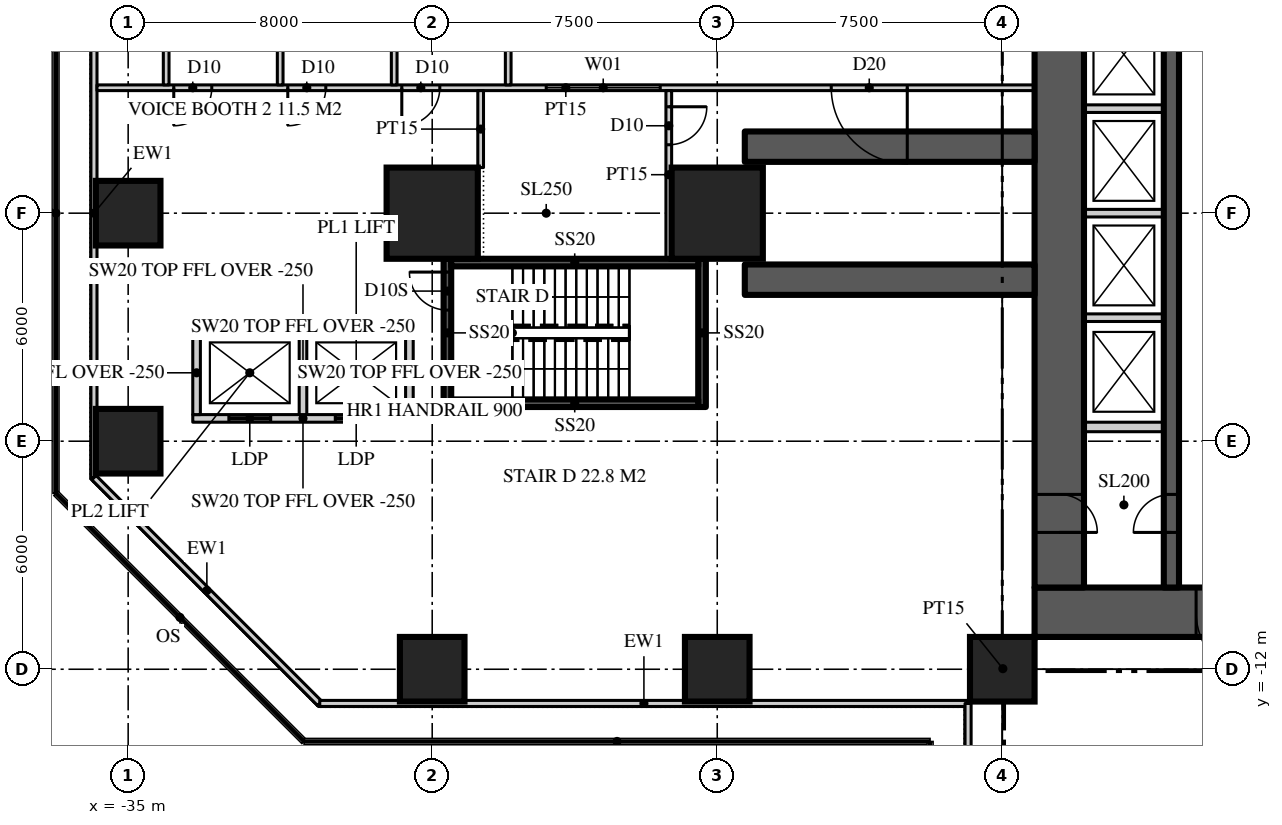
"""IFC4 building model, lengths in metres.
Left out: names, types, materials, properties, quantities, classifications, styles, units other than length and angle.
Written with IfcOpenShell. Run it as: python <this file> out.ifc"""

import sys

from ifc_helpers import new_model, si_unit, direction, frame, frame_2d, origin, origin_2d, place, context, subcontext, project, spatial, rectangle, extrude, element, fill, save


model = new_model("IFC4")
c1 = context("Model", 3, precision=1e-05, world=origin(), true_north=direction((0.0, 1.0)))
c2 = subcontext(c1, "Body", "Model", "MODEL_VIEW")
j1 = project(units=[si_unit("LENGTHUNIT", "METRE"), si_unit("PLANEANGLEUNIT", "RADIAN")], contexts=[c1])
p1 = place(None, origin())
s1 = spatial("IfcSite", under=j1, at=p1, CompositionType="ELEMENT")
p2 = place(p1, origin())
s2 = spatial("IfcBuilding", under=s1, at=p2, CompositionType="ELEMENT")
p3 = place(p2, frame((0.0, 0.0, 15.0)))
s3 = spatial("IfcBuildingStorey", under=s2, at=p3, CompositionType="ELEMENT", Elevation=15.0)
p4 = place(p3, frame((11.15, -10.5, 0.0), z_axis=(0.0, 0.0, 1.0), x_axis=(-1.0, 0.0, 0.0)))
e1 = element("IfcWall", 1, at=p4, inside=s3, PredefinedType="SHEAR", context=c2, shape_type="SweptSolid", body=[
    extrude(rectangle(XDim=22.3, YDim=1.3, at=frame_2d((11.15, 0.0))), origin(), (0.0, 0.0, 1.0), 8.0),
])
p5 = place(p4, frame((16.25, 0.0, 0.0)))
e2 = element("IfcOpeningElement", 2, at=p5, cuts=e1, PredefinedType="OPENING", context=c2, shape_type="SweptSolid", body=[
    extrude(rectangle(XDim=1.8, YDim=2.2, at=frame_2d((0.9, 1.1))), frame((0.0, 0.66, 0.0), z_axis=(0.0, -1.0, 0.0), x_axis=(1.0, 0.0, 0.0)), (0.0, 0.0, 1.0), 1.32),
])
p6 = place(p4, frame((4.25, 0.0, 0.0)))
e3 = element("IfcOpeningElement", 3, at=p6, cuts=e1, PredefinedType="OPENING", context=c2, shape_type="SweptSolid", body=[
    extrude(rectangle(XDim=1.8, YDim=2.2, at=frame_2d((0.9, 1.1))), frame((0.0, 0.66, 0.0), z_axis=(0.0, -1.0, 0.0), x_axis=(1.0, 0.0, 0.0)), (0.0, 0.0, 1.0), 1.32),
])
p7 = place(p3, frame((-10.5, 9.85, 0.0), z_axis=(0.0, 0.0, 1.0), x_axis=(0.0, -1.0, 0.0)))
e4 = element("IfcWall", 4, at=p7, inside=s3, PredefinedType="SHEAR", context=c2, shape_type="SweptSolid", body=[
    extrude(rectangle(XDim=19.7, YDim=1.3, at=frame_2d((9.85, 0.0))), origin(), (0.0, 0.0, 1.0), 8.0),
])
p8 = place(p7, frame((17.25, 0.0, 0.0)))
e5 = element("IfcOpeningElement", 5, at=p8, cuts=e4, PredefinedType="OPENING", context=c2, shape_type="SweptSolid", body=[
    extrude(rectangle(XDim=1.0, YDim=2.2, at=frame_2d((0.5, 1.1))), frame((0.0, 0.66, 0.0), z_axis=(0.0, -1.0, 0.0), x_axis=(1.0, 0.0, 0.0)), (0.0, 0.0, 1.0), 1.32),
])
for number, where, z_axis, x_axis in (
    (6, (-11.15, 1.75, 0.0), (0.0, 0.0, 1.0), (-1.0, 0.0, 0.0)),
    (7, (-11.15, -1.75, 0.0), (0.0, 0.0, 1.0), (-1.0, 0.0, 0.0)),
):
    element("IfcWall", number, at=place(p3, frame(where, z_axis=z_axis, x_axis=x_axis)), inside=s3, PredefinedType="SHEAR", context=c2, shape_type="SweptSolid", body=[
        extrude(rectangle(XDim=7.625, YDim=0.8, at=frame_2d((3.812, 0.0))), origin(), (0.0, 0.0, 1.0), 8.0),
    ])
for number, where, z_axis, x_axis in (
    (8, (-27.0, -12.0, 0.0), (0.0, 0.0, 1.0), (1.0, 0.0, 0.0)),
    (9, (-19.5, -12.0, 0.0), (0.0, 0.0, 1.0), (1.0, 0.0, 0.0)),
    (10, (-12.0, -12.0, 0.0), (0.0, 0.0, 1.0), (1.0, 0.0, 0.0)),
    (11, (-35.0, -6.0, 0.0), (0.0, 0.0, 1.0), (1.0, 0.0, 0.0)),
    (12, (-35.0, 0.0, 0.0), (0.0, 0.0, 1.0), (1.0, 0.0, 0.0)),
):
    element("IfcColumn", number, at=place(p3, frame(where, z_axis=z_axis, x_axis=x_axis)), inside=s3, PredefinedType="COLUMN", context=c2, shape_type="SweptSolid", body=[
        extrude(rectangle(XDim=1.7, YDim=1.7, at=origin_2d()), origin(), (0.0, 0.0, 1.0), 8.0),
    ])
for number, where, z_axis, x_axis in (
    (13, (-27.0, 0.0, 0.0), (0.0, 0.0, 1.0), (1.0, 0.0, 0.0)),
    (14, (-19.5, 0.0, 0.0), (0.0, 0.0, 1.0), (1.0, 0.0, 0.0)),
):
    element("IfcColumn", number, at=place(p3, frame(where, z_axis=z_axis, x_axis=x_axis)), inside=s3, PredefinedType="COLUMN", context=c2, shape_type="SweptSolid", body=[
        extrude(rectangle(XDim=2.4, YDim=2.4, at=origin_2d()), origin(), (0.0, 0.0, 1.0), 8.0),
    ])
p9 = place(p3, frame((-35.9, 6.958, 0.0), z_axis=(0.0, 0.0, 1.0), x_axis=(0.0, -1.0, 0.0)))
e15 = element("IfcWall", 15, at=p9, inside=s3, PredefinedType="SOLIDWALL", context=c2, shape_type="SweptSolid", body=[
    extrude(rectangle(XDim=13.917, YDim=0.16, at=frame_2d((6.958, 0.0))), origin(), (0.0, 0.0, 1.0), 7.75),
])
p10 = place(p3, frame((-35.9, -6.958, 0.0), z_axis=(0.0, 0.0, 1.0), x_axis=(0.707106781187, -0.707106781187, 0.0)))
e16 = element("IfcWall", 16, at=p10, inside=s3, PredefinedType="SOLIDWALL", context=c2, shape_type="SweptSolid", body=[
    extrude(rectangle(XDim=8.402, YDim=0.16, at=frame_2d((4.201, 0.0))), origin(), (0.0, 0.0, 1.0), 7.75),
])
for number, where, z_axis, x_axis in (
    (17, (-29.958, -12.9, 0.0), (0.0, 0.0, 1.0), (1.0, 0.0, 0.0)),
    (18, (-12.9, -12.9, 0.0), (0.0, 0.0, 1.0), (0.0, -1.0, 0.0)),
):
    element("IfcWall", number, at=place(p3, frame(where, z_axis=z_axis, x_axis=x_axis)), inside=s3, PredefinedType="SOLIDWALL", context=c2, shape_type="SweptSolid", body=[
        extrude(rectangle(XDim=17.059, YDim=0.16, at=frame_2d((8.529, 0.0))), origin(), (0.0, 0.0, 1.0), 7.75),
    ])
p11 = place(p3, frame((-7.55, -9.85, 0.0), z_axis=(0.0, 0.0, 1.0), x_axis=(0.0, 1.0, 0.0)))
e19 = element("IfcWall", 19, at=p11, inside=s3, PredefinedType="SHEAR", context=c2, shape_type="SweptSolid", body=[
    extrude(rectangle(XDim=19.7, YDim=0.4, at=frame_2d((9.85, 0.0))), origin(), (0.0, 0.0, 1.0), 8.0),
])
p12 = place(p11, frame((1.45, 0.0, 0.0)))
e20 = element("IfcOpeningElement", 20, at=p12, cuts=e19, PredefinedType="OPENING", context=c2, shape_type="SweptSolid", body=[
    extrude(rectangle(XDim=1.0, YDim=2.2, at=frame_2d((0.5, 1.1))), frame((0.0, 0.21, 0.0), z_axis=(0.0, -1.0, 0.0), x_axis=(1.0, 0.0, 0.0)), (0.0, 0.0, 1.0), 0.42),
])
p13 = place(p11, frame((17.3, 0.0, 0.0)))
e21 = element("IfcOpeningElement", 21, at=p13, cuts=e19, PredefinedType="OPENING", context=c2, shape_type="SweptSolid", body=[
    extrude(rectangle(XDim=0.9, YDim=2.1, at=frame_2d((0.45, 1.05))), frame((0.0, 0.21, 0.0), z_axis=(0.0, -1.0, 0.0), x_axis=(1.0, 0.0, 0.0)), (0.0, 0.0, 1.0), 0.42),
])
p14 = place(p3, frame((-9.85, -5.625, 0.0), z_axis=(0.0, 0.0, 1.0), x_axis=(1.0, 0.0, 0.0)))
e22 = element("IfcWall", 22, at=p14, inside=s3, PredefinedType="SOLIDWALL", context=c2, shape_type="SweptSolid", body=[
    extrude(rectangle(XDim=2.1, YDim=0.25, at=frame_2d((1.05, 0.0))), origin(), (0.0, 0.0, 1.0), 7.8),
])
for number, where, z_axis, x_axis in (
    (23, (-9.85, -2.75, 0.0), (0.0, 0.0, 1.0), (1.0, 0.0, 0.0)),
    (24, (-9.85, 0.0, 0.0), (0.0, 0.0, 1.0), (1.0, 0.0, 0.0)),
    (25, (-9.85, 2.75, 0.0), (0.0, 0.0, 1.0), (1.0, 0.0, 0.0)),
):
    element("IfcWall", number, at=place(p3, frame(where, z_axis=z_axis, x_axis=x_axis)), inside=s3, PredefinedType="SOLIDWALL", context=c2, shape_type="SweptSolid", body=[
        extrude(rectangle(XDim=2.1, YDim=0.2, at=frame_2d((1.05, 0.0))), origin(), (0.0, 0.0, 1.0), 7.8),
    ])
p15 = place(p3, frame((-11.15, 3.3, 0.0), z_axis=(0.0, 0.0, 1.0), x_axis=(-1.0, 0.0, 0.0)))
e26 = element("IfcWall", 26, at=p15, inside=s3, PredefinedType="PARTITIONING", context=c2, shape_type="SweptSolid", body=[
    extrude(rectangle(XDim=24.67, YDim=0.15, at=frame_2d((12.335, 0.0))), origin(), (0.0, 0.0, 1.0), 7.75),
])
p16 = place(p15, frame((3.35, 0.0, 0.0)))
e27 = element("IfcOpeningElement", 27, at=p16, cuts=e26, PredefinedType="OPENING", context=c2, shape_type="SweptSolid", body=[
    extrude(rectangle(XDim=2.0, YDim=2.6, at=frame_2d((1.0, 1.3))), frame((0.0, 0.085, 0.0), z_axis=(0.0, -1.0, 0.0), x_axis=(1.0, 0.0, 0.0)), (0.0, 0.0, 1.0), 0.17),
])
p17 = place(p15, frame((15.65, 0.0, 0.0)))
e28 = element("IfcOpeningElement", 28, at=p17, cuts=e26, PredefinedType="OPENING", context=c2, shape_type="SweptSolid", body=[
    extrude(rectangle(XDim=1.0, YDim=2.2, at=frame_2d((0.5, 1.1))), frame((0.0, 0.085, 0.0), z_axis=(0.0, -1.0, 0.0), x_axis=(1.0, 0.0, 0.0)), (0.0, 0.0, 1.0), 0.17),
])
p18 = place(p15, frame((18.65, 0.0, 0.0)))
e29 = element("IfcOpeningElement", 29, at=p18, cuts=e26, PredefinedType="OPENING", context=c2, shape_type="SweptSolid", body=[
    extrude(rectangle(XDim=1.0, YDim=2.2, at=frame_2d((0.5, 1.1))), frame((0.0, 0.085, 0.0), z_axis=(0.0, -1.0, 0.0), x_axis=(1.0, 0.0, 0.0)), (0.0, 0.0, 1.0), 0.17),
])
p19 = place(p15, frame((21.65, 0.0, 0.0)))
e30 = element("IfcOpeningElement", 30, at=p19, cuts=e26, PredefinedType="OPENING", context=c2, shape_type="SweptSolid", body=[
    extrude(rectangle(XDim=1.0, YDim=2.2, at=frame_2d((0.5, 1.1))), frame((0.0, 0.085, 0.0), z_axis=(0.0, -1.0, 0.0), x_axis=(1.0, 0.0, 0.0)), (0.0, 0.0, 1.0), 0.17),
])
p20 = place(p15, frame((9.85, 0.0, 0.9)))
e31 = element("IfcOpeningElement", 31, at=p20, cuts=e26, PredefinedType="OPENING", context=c2, shape_type="SweptSolid", body=[
    extrude(rectangle(XDim=3.0, YDim=1.5, at=frame_2d((1.5, 0.75))), frame((0.0, 0.085, 0.0), z_axis=(0.0, -1.0, 0.0), x_axis=(1.0, 0.0, 0.0)), (0.0, 0.0, 1.0), 0.17),
])
p21 = place(p3, frame((-20.775, 3.225, 0.0), z_axis=(0.0, 0.0, 1.0), x_axis=(0.0, -1.0, 0.0)))
e32 = element("IfcWall", 32, at=p21, inside=s3, PredefinedType="PARTITIONING", context=c2, shape_type="SweptSolid", body=[
    extrude(rectangle(XDim=4.425, YDim=0.15, at=frame_2d((2.212, 0.0))), origin(), (0.0, 0.0, 1.0), 7.75),
])
p22 = place(p21, frame((0.425, 0.0, 0.0)))
e33 = element("IfcOpeningElement", 33, at=p22, cuts=e32, PredefinedType="OPENING", context=c2, shape_type="SweptSolid", body=[
    extrude(rectangle(XDim=1.0, YDim=2.2, at=frame_2d((0.5, 1.1))), frame((0.0, 0.085, 0.0), z_axis=(0.0, -1.0, 0.0), x_axis=(1.0, 0.0, 0.0)), (0.0, 0.0, 1.0), 0.17),
])
p23 = place(p3, frame((-25.725, 3.225, 0.0), z_axis=(0.0, 0.0, 1.0), x_axis=(0.0, -1.0, 0.0)))
e34 = element("IfcWall", 34, at=p23, inside=s3, PredefinedType="PARTITIONING", context=c2, shape_type="SweptSolid", body=[
    extrude(rectangle(XDim=2.025, YDim=0.15, at=frame_2d((1.013, 0.0))), origin(), (0.0, 0.0, 1.0), 7.75),
])
for number, where, z_axis, x_axis in (
    (35, (-25.0, 3.375, 0.0), (0.0, 0.0, 1.0), (0.0, 1.0, 0.0)),
    (36, (-28.0, 3.375, 0.0), (0.0, 0.0, 1.0), (0.0, 1.0, 0.0)),
    (37, (-31.0, 3.375, 0.0), (0.0, 0.0, 1.0), (0.0, 1.0, 0.0)),
    (38, (-34.0, 3.375, 0.0), (0.0, 0.0, 1.0), (0.0, 1.0, 0.0)),
):
    element("IfcWall", number, at=place(p3, frame(where, z_axis=z_axis, x_axis=x_axis)), inside=s3, PredefinedType="PARTITIONING", context=c2, shape_type="SweptSolid", body=[
        extrude(rectangle(XDim=4.025, YDim=0.15, at=frame_2d((2.012, 0.0))), origin(), (0.0, 0.0, 1.0), 7.75),
    ])
p24 = place(p3, frame((-11.15, -11.15, 0.0), z_axis=(0.0, 0.0, 1.0), x_axis=(-0.707106781187, -0.707106781187, 0.0)))
e39 = element("IfcWall", 39, at=p24, inside=s3, PredefinedType="PARTITIONING", context=c2, shape_type="SweptSolid", body=[
    extrude(rectangle(XDim=2.362, YDim=0.15, at=frame_2d((1.181, 0.0))), origin(), (0.0, 0.0, 1.0), 7.75),
])
p25 = place(p3, frame((-27.5, -3.0, 0.0), z_axis=(0.0, 0.0, 1.0), x_axis=(-1.0, 0.0, 0.0)))
e40 = element("IfcWall", 40, at=p25, inside=s3, PredefinedType="SOLIDWALL", context=c2, shape_type="SweptSolid", body=[
    extrude(rectangle(XDim=5.8, YDim=0.2, at=frame_2d((2.9, 0.0))), origin(), (0.0, 0.0, 1.0), 7.75),
])
p26 = place(p3, frame((-33.3, -5.4, 0.0), z_axis=(0.0, 0.0, 1.0), x_axis=(1.0, 0.0, 0.0)))
e41 = element("IfcWall", 41, at=p26, inside=s3, PredefinedType="SOLIDWALL", context=c2, shape_type="SweptSolid", body=[
    extrude(rectangle(XDim=5.8, YDim=0.2, at=frame_2d((2.9, 0.0))), origin(), (0.0, 0.0, 1.0), 7.75),
])
p27 = place(p26, frame((3.75, 0.0, 0.0)))
e42 = element("IfcOpeningElement", 42, at=p27, cuts=e41, PredefinedType="OPENING", context=c2, shape_type="SweptSolid", body=[
    extrude(rectangle(XDim=1.1, YDim=2.2, at=frame_2d((0.55, 1.1))), frame((0.0, 0.11, 0.0), z_axis=(0.0, -1.0, 0.0), x_axis=(1.0, 0.0, 0.0)), (0.0, 0.0, 1.0), 0.22),
])
p28 = place(p26, frame((0.95, 0.0, 0.0)))
e43 = element("IfcOpeningElement", 43, at=p28, cuts=e41, PredefinedType="OPENING", context=c2, shape_type="SweptSolid", body=[
    extrude(rectangle(XDim=1.1, YDim=2.2, at=frame_2d((0.55, 1.1))), frame((0.0, 0.11, 0.0), z_axis=(0.0, -1.0, 0.0), x_axis=(1.0, 0.0, 0.0)), (0.0, 0.0, 1.0), 0.22),
])
for number, where, z_axis, x_axis in (
    (44, (-27.6, -3.1, 0.0), (0.0, 0.0, 1.0), (0.0, -1.0, 0.0)),
    (45, (-30.4, -3.1, 0.0), (0.0, 0.0, 1.0), (0.0, -1.0, 0.0)),
    (46, (-33.2, -3.1, 0.0), (0.0, 0.0, 1.0), (0.0, -1.0, 0.0)),
):
    element("IfcWall", number, at=place(p3, frame(where, z_axis=z_axis, x_axis=x_axis)), inside=s3, PredefinedType="SOLIDWALL", context=c2, shape_type="SweptSolid", body=[
        extrude(rectangle(XDim=2.2, YDim=0.2, at=frame_2d((1.1, 0.0))), origin(), (0.0, 0.0, 1.0), 7.75),
    ])
p29 = place(p3, frame((-19.9, -1.2, 0.0), z_axis=(0.0, 0.0, 1.0), x_axis=(0.0, -1.0, 0.0)))
e47 = element("IfcWall", 47, at=p29, inside=s3, PredefinedType="SOLIDWALL", context=c2, shape_type="SweptSolid", body=[
    extrude(rectangle(XDim=3.9, YDim=0.2, at=frame_2d((1.95, 0.0))), origin(), (0.0, 0.0, 1.0), 7.75),
])
p30 = place(p3, frame((-26.6, -5.1, 0.0), z_axis=(0.0, 0.0, 1.0), x_axis=(0.0, 1.0, 0.0)))
e48 = element("IfcWall", 48, at=p30, inside=s3, PredefinedType="SOLIDWALL", context=c2, shape_type="SweptSolid", body=[
    extrude(rectangle(XDim=3.9, YDim=0.2, at=frame_2d((1.95, 0.0))), origin(), (0.0, 0.0, 1.0), 7.75),
])
p31 = place(p30, frame((2.55, 0.0, 0.0)))
e49 = element("IfcOpeningElement", 49, at=p31, cuts=e48, PredefinedType="OPENING", context=c2, shape_type="SweptSolid", body=[
    extrude(rectangle(XDim=1.0, YDim=2.2, at=frame_2d((0.5, 1.1))), frame((0.0, 0.11, 0.0), z_axis=(0.0, -1.0, 0.0), x_axis=(1.0, 0.0, 0.0)), (0.0, 0.0, 1.0), 0.22),
])
for number, where, z_axis, x_axis in (
    (50, (-20.0, -1.3, 0.0), (0.0, 0.0, 1.0), (-1.0, 0.0, 0.0)),
    (51, (-26.5, -5.0, 0.0), (0.0, 0.0, 1.0), (1.0, 0.0, 0.0)),
):
    element("IfcWall", number, at=place(p3, frame(where, z_axis=z_axis, x_axis=x_axis)), inside=s3, PredefinedType="SOLIDWALL", context=c2, shape_type="SweptSolid", body=[
        extrude(rectangle(XDim=6.5, YDim=0.2, at=frame_2d((3.25, 0.0))), origin(), (0.0, 0.0, 1.0), 7.75),
    ])
p32 = place(p27, origin())
e52 = element("IfcDoor", 52, at=p32, inside=s3, OperationType="SLIDING_TO_LEFT", PredefinedType="DOOR", context=c2, shape_type="SweptSolid", body=[
    extrude(rectangle(XDim=1.1, YDim=2.2, at=frame_2d((0.55, 1.1))), frame((0.0, 0.025, 0.0), z_axis=(0.0, -1.0, 0.0), x_axis=(1.0, 0.0, 0.0)), (0.0, 0.0, 1.0), 0.05),
])
fill(e42, e52)
p33 = place(p28, origin())
e53 = element("IfcDoor", 53, at=p33, inside=s3, OperationType="SLIDING_TO_LEFT", PredefinedType="DOOR", context=c2, shape_type="SweptSolid", body=[
    extrude(rectangle(XDim=1.1, YDim=2.2, at=frame_2d((0.55, 1.1))), frame((0.0, 0.025, 0.0), z_axis=(0.0, -1.0, 0.0), x_axis=(1.0, 0.0, 0.0)), (0.0, 0.0, 1.0), 0.05),
])
fill(e43, e53)
p34 = place(p5, origin())
e54 = element("IfcDoor", 54, at=p34, inside=s3, OperationType="DOUBLE_DOOR_DOUBLE_SWING", PredefinedType="DOOR", context=c2, shape_type="SweptSolid", body=[
    extrude(rectangle(XDim=1.8, YDim=2.2, at=frame_2d((0.9, 1.1))), frame((0.0, 0.025, 0.0), z_axis=(0.0, -1.0, 0.0), x_axis=(1.0, 0.0, 0.0)), (0.0, 0.0, 1.0), 0.05),
])
fill(e2, e54)
p35 = place(p12, origin())
e55 = element("IfcDoor", 55, at=p35, inside=s3, OperationType="SINGLE_SWING_LEFT", PredefinedType="DOOR", context=c2, shape_type="SweptSolid", body=[
    extrude(rectangle(XDim=1.0, YDim=2.2, at=frame_2d((0.5, 1.1))), frame((0.0, 0.025, 0.0), z_axis=(0.0, -1.0, 0.0), x_axis=(1.0, 0.0, 0.0)), (0.0, 0.0, 1.0), 0.05),
])
fill(e20, e55)
p36 = place(p8, origin())
e56 = element("IfcDoor", 56, at=p36, inside=s3, OperationType="SINGLE_SWING_RIGHT", PredefinedType="DOOR", context=c2, shape_type="SweptSolid", body=[
    extrude(rectangle(XDim=1.0, YDim=2.2, at=frame_2d((0.5, 1.1))), frame((0.0, 0.025, 0.0), z_axis=(0.0, -1.0, 0.0), x_axis=(1.0, 0.0, 0.0)), (0.0, 0.0, 1.0), 0.05),
])
fill(e5, e56)
p37 = place(p16, origin())
e57 = element("IfcDoor", 57, at=p37, inside=s3, OperationType="DOUBLE_DOOR_DOUBLE_SWING", PredefinedType="DOOR", context=c2, shape_type="SweptSolid", body=[
    extrude(rectangle(XDim=2.0, YDim=2.6, at=frame_2d((1.0, 1.3))), frame((0.0, 0.025, 0.0), z_axis=(0.0, -1.0, 0.0), x_axis=(1.0, 0.0, 0.0)), (0.0, 0.0, 1.0), 0.05),
])
fill(e27, e57)
p38 = place(p22, origin())
e58 = element("IfcDoor", 58, at=p38, inside=s3, OperationType="SINGLE_SWING_LEFT", PredefinedType="DOOR", context=c2, shape_type="SweptSolid", body=[
    extrude(rectangle(XDim=1.0, YDim=2.2, at=frame_2d((0.5, 1.1))), frame((0.0, 0.025, 0.0), z_axis=(0.0, -1.0, 0.0), x_axis=(1.0, 0.0, 0.0)), (0.0, 0.0, 1.0), 0.05),
])
fill(e33, e58)
p39 = place(p17, origin())
e59 = element("IfcDoor", 59, at=p39, inside=s3, OperationType="SINGLE_SWING_RIGHT", PredefinedType="DOOR", context=c2, shape_type="SweptSolid", body=[
    extrude(rectangle(XDim=1.0, YDim=2.2, at=frame_2d((0.5, 1.1))), frame((0.0, 0.025, 0.0), z_axis=(0.0, -1.0, 0.0), x_axis=(1.0, 0.0, 0.0)), (0.0, 0.0, 1.0), 0.05),
])
fill(e28, e59)
p40 = place(p18, origin())
e60 = element("IfcDoor", 60, at=p40, inside=s3, OperationType="SINGLE_SWING_RIGHT", PredefinedType="DOOR", context=c2, shape_type="SweptSolid", body=[
    extrude(rectangle(XDim=1.0, YDim=2.2, at=frame_2d((0.5, 1.1))), frame((0.0, 0.025, 0.0), z_axis=(0.0, -1.0, 0.0), x_axis=(1.0, 0.0, 0.0)), (0.0, 0.0, 1.0), 0.05),
])
fill(e29, e60)
p41 = place(p19, origin())
e61 = element("IfcDoor", 61, at=p41, inside=s3, OperationType="SINGLE_SWING_RIGHT", PredefinedType="DOOR", context=c2, shape_type="SweptSolid", body=[
    extrude(rectangle(XDim=1.0, YDim=2.2, at=frame_2d((0.5, 1.1))), frame((0.0, 0.025, 0.0), z_axis=(0.0, -1.0, 0.0), x_axis=(1.0, 0.0, 0.0)), (0.0, 0.0, 1.0), 0.05),
])
fill(e30, e61)
p42 = place(p31, origin())
e62 = element("IfcDoor", 62, at=p42, inside=s3, OperationType="SINGLE_SWING_RIGHT", PredefinedType="DOOR", context=c2, shape_type="SweptSolid", body=[
    extrude(rectangle(XDim=1.0, YDim=2.2, at=frame_2d((0.5, 1.1))), frame((0.0, 0.025, 0.0), z_axis=(0.0, -1.0, 0.0), x_axis=(1.0, 0.0, 0.0)), (0.0, 0.0, 1.0), 0.05),
])
fill(e49, e62)
p43 = place(p20, origin())
e63 = element("IfcWindow", 63, at=p43, inside=s3, PartitioningType="SINGLE_PANEL", PredefinedType="WINDOW", context=c2, shape_type="SweptSolid", body=[
    extrude(rectangle(XDim=3.0, YDim=1.5, at=frame_2d((1.5, 0.75))), frame((0.0, 0.03, 0.0), z_axis=(0.0, -1.0, 0.0), x_axis=(1.0, 0.0, 0.0)), (0.0, 0.0, 1.0), 0.06),
])
fill(e31, e63)
save(model, sys.argv[1])
